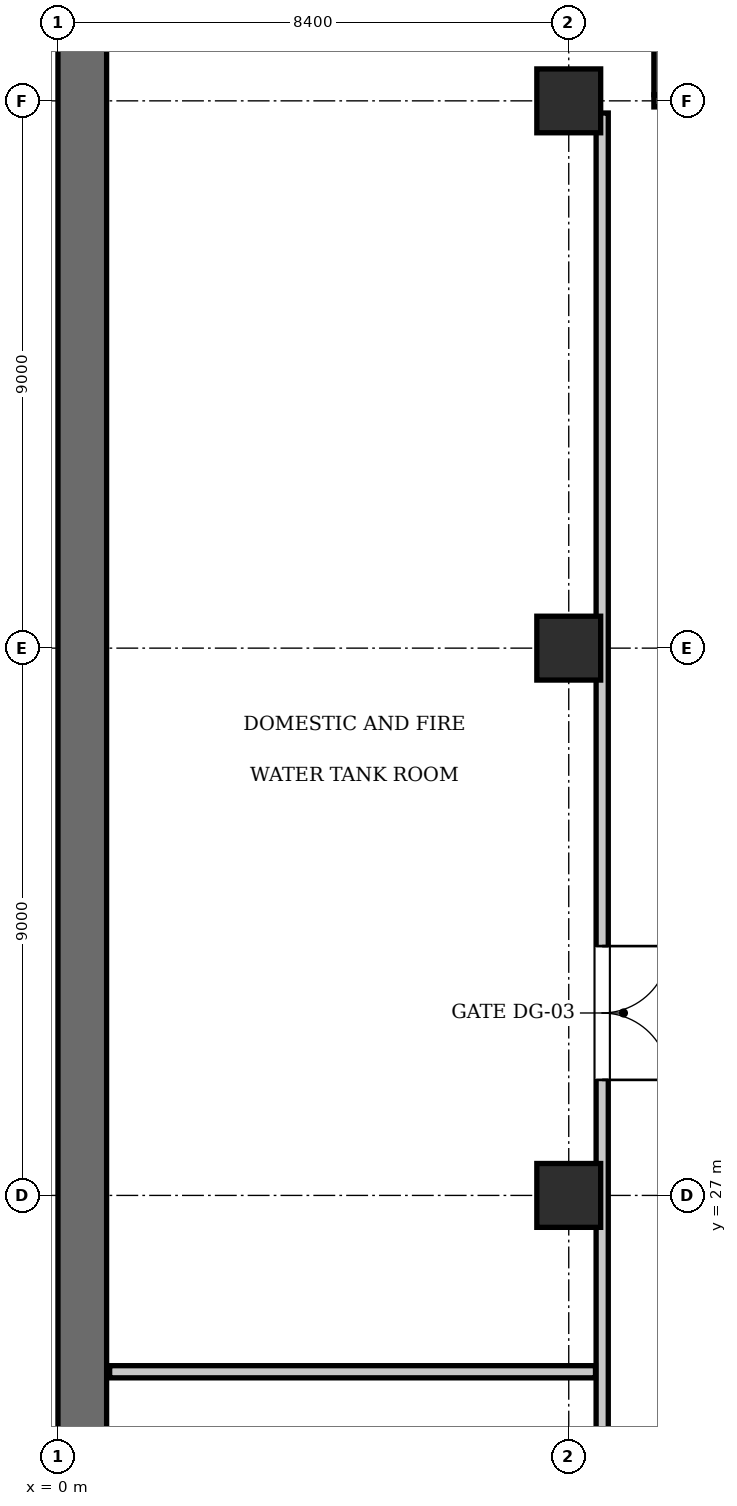
"""IFC4 building model, lengths in metres.
Left out: names, types, materials, properties, quantities, classifications, styles, units other than length and angle.
Written with IfcOpenShell. Run it as: python <this file> out.ifc"""

import sys

from ifc_helpers import new_model, si_unit, direction, frame, frame_2d, origin, origin_2d, place, context, subcontext, project, spatial, rectangle, extrude, element, fill, save


model = new_model("IFC4")
c1 = context("Model", 3, precision=1e-05, world=origin(), true_north=direction((0.0, 1.0)))
c2 = subcontext(c1, "Body", "Model", "MODEL_VIEW")
j1 = project(units=[si_unit("LENGTHUNIT", "METRE"), si_unit("PLANEANGLEUNIT", "RADIAN")], contexts=[c1])
p1 = place(None, origin())
s1 = spatial("IfcSite", under=j1, at=p1, CompositionType="ELEMENT")
p2 = place(p1, origin())
s2 = spatial("IfcBuilding", under=s1, at=p2, CompositionType="ELEMENT")
p3 = place(p2, frame((0.0, 0.0, -9.8)))
s3 = spatial("IfcBuildingStorey", under=s2, at=p3, CompositionType="ELEMENT", Elevation=-9.8)
p4 = place(p3, frame((0.4, 0.8, 0.0), z_axis=(0.0, 0.0, 1.0), x_axis=(0.0, 1.0, 0.0)))
e1 = element("IfcWall", 1, at=p4, inside=s3, PredefinedType="USERDEFINED", context=c2, shape_type="SweptSolid", body=[
    extrude(rectangle(XDim=52.4, YDim=0.8, at=frame_2d((26.2, 0.0))), origin(), (0.0, 0.0, 1.0), 4.55),
])
for number, where, z_axis, x_axis in (
    (2, (8.4, 27.0, -0.4), (0.0, 0.0, 1.0), (1.0, 0.0, 0.0)),
    (3, (8.4, 36.0, -0.4), (0.0, 0.0, 1.0), (1.0, 0.0, 0.0)),
    (4, (8.4, 45.0, -0.4), (0.0, 0.0, 1.0), (1.0, 0.0, 0.0)),
):
    element("IfcColumn", number, at=place(p3, frame(where, z_axis=z_axis, x_axis=x_axis)), inside=s3, PredefinedType="COLUMN", context=c2, shape_type="SweptSolid", body=[
        extrude(rectangle(XDim=1.05, YDim=1.05, at=origin_2d()), origin(), (0.0, 0.0, 1.0), 4.95),
    ])
p5 = place(p3, frame((9.8, 45.0, 0.0), z_axis=(0.0, 0.0, 1.0), x_axis=(1.0, 0.0, 0.0)))
e5 = element("IfcWall", 5, at=p5, inside=s3, PredefinedType="SOLIDWALL", context=c2, shape_type="SweptSolid", body=[
    extrude(rectangle(XDim=4.05, YDim=0.2, at=frame_2d((2.025, 0.0))), origin(), (0.0, 0.0, 1.0), 3.565),
])
p6 = place(p3, frame((9.9, 45.1, 0.0), z_axis=(0.0, 0.0, 1.0), x_axis=(0.0, 1.0, 0.0)))
e6 = element("IfcWall", 6, at=p6, inside=s3, PredefinedType="SOLIDWALL", context=c2, shape_type="SweptSolid", body=[
    extrude(rectangle(XDim=8.1, YDim=0.2, at=frame_2d((4.05, 0.0))), origin(), (0.0, 0.0, 1.0), 4.2),
])
p7 = place(p3, frame((8.95, 0.9, 0.0), z_axis=(0.0, 0.0, 1.0), x_axis=(0.0, 1.0, 0.0)))
e7 = element("IfcWall", 7, at=p7, inside=s3, PredefinedType="PARTITIONING", context=c2, shape_type="SweptSolid", body=[
    extrude(rectangle(XDim=43.9, YDim=0.2, at=frame_2d((21.95, 0.0))), origin(), (0.0, 0.0, 1.0), 4.2),
])
p8 = place(p7, frame((4.0, 0.0, 0.0)))
e8 = element("IfcOpeningElement", 8, at=p8, cuts=e7, PredefinedType="OPENING", context=c2, shape_type="SweptSolid", body=[
    extrude(rectangle(XDim=2.2, YDim=2.4, at=frame_2d((1.1, 1.2))), frame((0.0, 0.11, 0.0), z_axis=(0.0, -1.0, 0.0), x_axis=(1.0, 0.0, 0.0)), (0.0, 0.0, 1.0), 0.22),
])
p9 = place(p7, frame((28.0, 0.0, 0.0)))
e9 = element("IfcOpeningElement", 9, at=p9, cuts=e7, PredefinedType="OPENING", context=c2, shape_type="SweptSolid", body=[
    extrude(rectangle(XDim=2.2, YDim=2.4, at=frame_2d((1.1, 1.2))), frame((0.0, 0.11, 0.0), z_axis=(0.0, -1.0, 0.0), x_axis=(1.0, 0.0, 0.0)), (0.0, 0.0, 1.0), 0.22),
])
p10 = place(p3, frame((0.85, 24.1, 0.0), z_axis=(0.0, 0.0, 1.0), x_axis=(1.0, 0.0, 0.0)))
e10 = element("IfcWall", 10, at=p10, inside=s3, PredefinedType="PARTITIONING", context=c2, shape_type="SweptSolid", body=[
    extrude(rectangle(XDim=7.99, YDim=0.2, at=frame_2d((3.995, 0.0))), origin(), (0.0, 0.0, 1.0), 4.2),
])
p11 = place(p9, frame((2.2, 0.0, 0.0), z_axis=(0.0, 0.0, 1.0), x_axis=(-1.0, 0.0, 0.0)))
e11 = element("IfcDoor", 11, at=p11, inside=s3, OperationType="DOUBLE_DOOR_SINGLE_SWING", PredefinedType="GATE", context=c2, shape_type="SweptSolid", body=[
    extrude(rectangle(XDim=2.2, YDim=2.4, at=frame_2d((1.1, 1.2))), frame((0.0, 0.025, 0.0), z_axis=(0.0, -1.0, 0.0), x_axis=(1.0, 0.0, 0.0)), (0.0, 0.0, 1.0), 0.05),
])
fill(e9, e11)
save(model, sys.argv[1])
